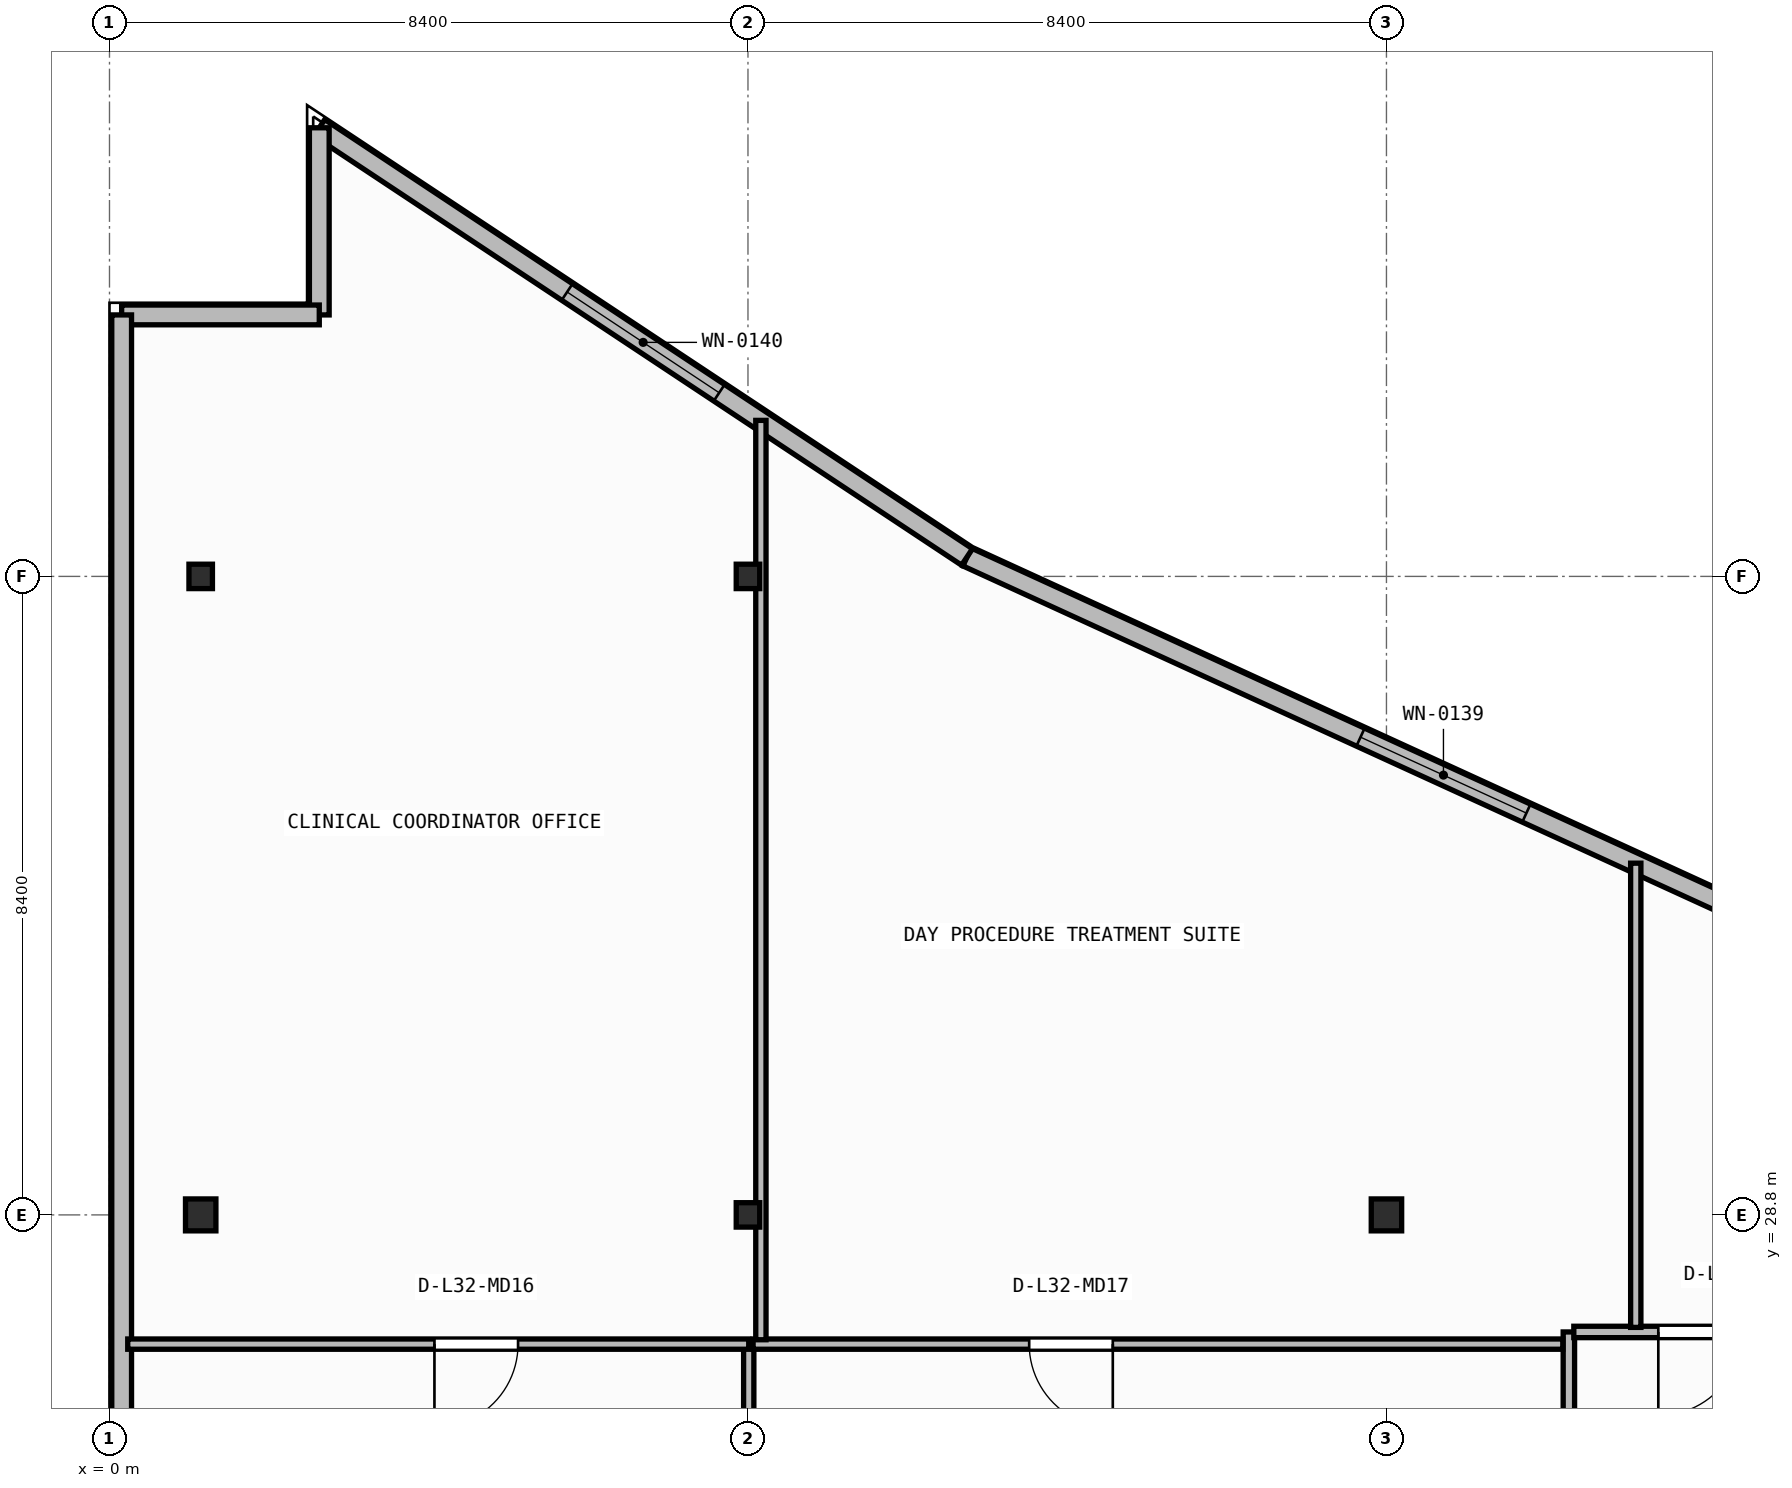
"""IFC4 building model, lengths in metres.
Left out: names, types, materials, properties, quantities, classifications, styles, units other than length and angle.
Written with IfcOpenShell. Run it as: python <this file> out.ifc"""

import sys

from ifc_helpers import new_model, si_unit, direction, frame, frame_2d, origin, origin_2d, place, context, subcontext, project, spatial, rectangle, i_section, extrude, element, fill, save


model = new_model("IFC4")
c1 = context("Model", 3, precision=1e-05, world=origin(), true_north=direction((0.0, 1.0)))
c2 = subcontext(c1, "Body", "Model", "MODEL_VIEW")
j1 = project(units=[si_unit("LENGTHUNIT", "METRE"), si_unit("PLANEANGLEUNIT", "RADIAN")], contexts=[c1])
p1 = place(None, origin())
s1 = spatial("IfcSite", under=j1, at=p1, CompositionType="ELEMENT")
p2 = place(p1, origin())
s2 = spatial("IfcBuilding", under=s1, at=p2, CompositionType="ELEMENT")
p3 = place(p2, frame((0.0, 0.0, 131.0)))
s3 = spatial("IfcBuildingStorey", under=s2, at=p3, CompositionType="ELEMENT", Elevation=131.0)
p4 = place(p3, frame((1.2, 28.8, 0.0), z_axis=(0.0, 0.0, 1.0), x_axis=(1.0, 0.0, 0.0)))
e1 = element("IfcColumn", 1, at=p4, inside=s3, PredefinedType="COLUMN", context=c2, shape_type="SweptSolid", body=[
    extrude(i_section(OverallWidth=0.4, OverallDepth=0.42, WebThickness=0.025, FlangeThickness=0.04, at=origin_2d()), origin(), (0.0, 0.0, 1.0), 3.95),
])
p5 = place(p3, frame((8.4, 28.8, 0.0), z_axis=(0.0, 0.0, 1.0), x_axis=(1.0, 0.0, 0.0)))
e2 = element("IfcColumn", 2, at=p5, inside=s3, PredefinedType="COLUMN", context=c2, shape_type="SweptSolid", body=[
    extrude(i_section(OverallWidth=0.309, OverallDepth=0.321, WebThickness=0.014, FlangeThickness=0.022, FilletRadius=0.017, at=origin_2d()), origin(), (0.0, 0.0, 1.0), 3.95),
])
p6 = place(p3, frame((16.8, 28.8, 0.0), z_axis=(0.0, 0.0, 1.0), x_axis=(1.0, 0.0, 0.0)))
e3 = element("IfcColumn", 3, at=p6, inside=s3, PredefinedType="COLUMN", context=c2, shape_type="SweptSolid", body=[
    extrude(i_section(OverallWidth=0.4, OverallDepth=0.42, WebThickness=0.025, FlangeThickness=0.04, at=origin_2d()), origin(), (0.0, 0.0, 1.0), 3.95),
])
for number, where, z_axis, x_axis in (
    (4, (1.2, 37.2, 0.0), (0.0, 0.0, 1.0), (1.0, 0.0, 0.0)),
    (5, (8.4, 37.2, 0.0), (0.0, 0.0, 1.0), (1.0, 0.0, 0.0)),
):
    element("IfcColumn", number, at=place(p3, frame(where, z_axis=z_axis, x_axis=x_axis)), inside=s3, PredefinedType="COLUMN", context=c2, shape_type="SweptSolid", body=[
        extrude(i_section(OverallWidth=0.309, OverallDepth=0.321, WebThickness=0.014, FlangeThickness=0.022, FilletRadius=0.017, at=origin_2d()), origin(), (0.0, 0.0, 1.0), 3.95),
    ])
p7 = place(p3, frame((23.818, 31.716, 0.0), z_axis=(0.0, 0.0, 1.0), x_axis=(-0.909209527513, 0.416338846471, 0.0)))
e6 = element("IfcWall", 6, at=p7, inside=s3, PredefinedType="STANDARD", context=c2, shape_type="SweptSolid", body=[
    extrude(rectangle(XDim=13.787, YDim=0.26, at=frame_2d((6.894, 0.0))), origin(), (0.0, 0.0, 1.0), 3.71),
])
p8 = place(p7, frame((5.694, 0.0, 0.9)))
e7 = element("IfcOpeningElement", 7, at=p8, cuts=e6, PredefinedType="OPENING", context=c2, shape_type="SweptSolid", body=[
    extrude(rectangle(XDim=2.4, YDim=1.65, at=frame_2d((1.2, 0.825))), frame((0.0, 0.14, 0.0), z_axis=(0.0, -1.0, 0.0), x_axis=(1.0, 0.0, 0.0)), (0.0, 0.0, 1.0), 0.28),
])
p9 = place(p3, frame((11.282, 37.456, 0.0), z_axis=(0.0, 0.0, 1.0), x_axis=(-0.833630474253, 0.552322580017, 0.0)))
e8 = element("IfcWall", 8, at=p9, inside=s3, PredefinedType="STANDARD", context=c2, shape_type="SweptSolid", body=[
    extrude(rectangle(XDim=10.223, YDim=0.26, at=frame_2d((5.111, 0.0))), origin(), (0.0, 0.0, 1.0), 3.71),
])
p10 = place(p9, frame((3.911, 0.0, 0.9)))
e9 = element("IfcOpeningElement", 9, at=p10, cuts=e8, PredefinedType="OPENING", context=c2, shape_type="SweptSolid", body=[
    extrude(rectangle(XDim=2.4, YDim=1.65, at=frame_2d((1.2, 0.825))), frame((0.0, 0.14, 0.0), z_axis=(0.0, -1.0, 0.0), x_axis=(1.0, 0.0, 0.0)), (0.0, 0.0, 1.0), 0.28),
])
p11 = place(p3, frame((2.76, 43.102, 0.0), z_axis=(0.0, 0.0, 1.0), x_axis=(0.0, -1.0, 0.0)))
e10 = element("IfcWall", 10, at=p11, inside=s3, PredefinedType="STANDARD", context=c2, shape_type="SweptSolid", body=[
    extrude(rectangle(XDim=2.462, YDim=0.26, at=frame_2d((1.231, 0.0))), origin(), (0.0, 0.0, 1.0), 3.71),
])
p12 = place(p3, frame((2.76, 40.64, 0.0), z_axis=(0.0, 0.0, 1.0), x_axis=(-1.0, 0.0, 0.0)))
e11 = element("IfcWall", 11, at=p12, inside=s3, PredefinedType="STANDARD", context=c2, shape_type="SweptSolid", body=[
    extrude(rectangle(XDim=2.6, YDim=0.26, at=frame_2d((1.3, 0.0))), origin(), (0.0, 0.0, 1.0), 3.71),
])
p13 = place(p3, frame((0.16, 40.64, 0.0), z_axis=(0.0, 0.0, 1.0), x_axis=(0.0, -1.0, 0.0)))
e12 = element("IfcWall", 12, at=p13, inside=s3, PredefinedType="STANDARD", context=c2, shape_type="SweptSolid", body=[
    extrude(rectangle(XDim=37.88, YDim=0.26, at=frame_2d((18.94, 0.0))), origin(), (0.0, 0.0, 1.0), 3.71),
])
p14 = place(p13, frame((27.795, 0.0, 0.9)))
e13 = element("IfcOpeningElement", 13, at=p14, cuts=e12, PredefinedType="OPENING", context=c2, shape_type="SweptSolid", body=[
    extrude(rectangle(XDim=2.4, YDim=1.65, at=frame_2d((1.2, 0.825))), frame((0.0, 0.14, 0.0), z_axis=(0.0, -1.0, 0.0), x_axis=(1.0, 0.0, 0.0)), (0.0, 0.0, 1.0), 0.28),
])
p15 = place(p3, frame((19.2, 27.26, 0.0), z_axis=(0.0, 0.0, 1.0), x_axis=(0.0, -1.0, 0.0)))
e14 = element("IfcWall", 14, at=p15, inside=s3, PredefinedType="PARTITIONING", context=c2, shape_type="SweptSolid", body=[
    extrude(rectangle(XDim=6.482, YDim=0.15, at=frame_2d((3.241, 0.0))), origin(), (0.0, 0.0, 1.0), 3.71),
])
p16 = place(p15, frame((2.068, 0.0, 0.0)))
e15 = element("IfcOpeningElement", 15, at=p16, cuts=e14, PredefinedType="OPENING", context=c2, shape_type="SweptSolid", body=[
    extrude(rectangle(XDim=1.1, YDim=2.1, at=frame_2d((0.55, 1.05))), frame((0.0, 0.085, 0.0), z_axis=(0.0, -1.0, 0.0), x_axis=(1.0, 0.0, 0.0)), (0.0, 0.0, 1.0), 0.17),
])
p17 = place(p3, frame((21.7, 27.26, 0.0), z_axis=(0.0, 0.0, 1.0), x_axis=(-1.0, 0.0, 0.0)))
e16 = element("IfcWall", 16, at=p17, inside=s3, PredefinedType="PARTITIONING", context=c2, shape_type="SweptSolid", body=[
    extrude(rectangle(XDim=2.435, YDim=0.15, at=frame_2d((1.218, 0.0))), origin(), (0.0, 0.0, 1.0), 3.71),
])
p18 = place(p17, frame((0.223, 0.0, 0.0)))
e17 = element("IfcOpeningElement", 17, at=p18, cuts=e16, PredefinedType="OPENING", context=c2, shape_type="SweptSolid", body=[
    extrude(rectangle(XDim=1.1, YDim=2.1, at=frame_2d((0.55, 1.05))), frame((0.0, 0.085, 0.0), z_axis=(0.0, -1.0, 0.0), x_axis=(1.0, 0.0, 0.0)), (0.0, 0.0, 1.0), 0.17),
])
p19 = place(p3, frame((8.41, 20.607, 0.0), z_axis=(0.0, 0.0, 1.0), x_axis=(0.0, 1.0, 0.0)))
e18 = element("IfcWall", 18, at=p19, inside=s3, PredefinedType="PARTITIONING", context=c2, shape_type="SweptSolid", body=[
    extrude(rectangle(XDim=6.493, YDim=0.135, at=frame_2d((3.246, 0.0))), origin(), (0.0, 0.0, 1.0), 3.152),
])
p20 = place(p3, frame((8.41, 27.1, 0.0), z_axis=(0.0, 0.0, 1.0), x_axis=(-1.0, 0.0, 0.0)))
e19 = element("IfcWall", 19, at=p20, inside=s3, PredefinedType="PARTITIONING", context=c2, shape_type="SweptSolid", body=[
    extrude(rectangle(XDim=8.17, YDim=0.135, at=frame_2d((4.085, 0.0))), origin(), (0.0, 0.0, 1.0), 3.71),
])
p21 = place(p20, frame((3.035, 0.0, 0.0)))
e20 = element("IfcOpeningElement", 20, at=p21, cuts=e19, PredefinedType="OPENING", context=c2, shape_type="SweptSolid", body=[
    extrude(rectangle(XDim=1.1, YDim=2.1, at=frame_2d((0.55, 1.05))), frame((0.0, 0.077, 0.0), z_axis=(0.0, -1.0, 0.0), x_axis=(1.0, 0.0, 0.0)), (0.0, 0.0, 1.0), 0.155),
])
p22 = place(p3, frame((19.12, 27.1, 0.0), z_axis=(0.0, 0.0, 1.0), x_axis=(-1.0, 0.0, 0.0)))
e21 = element("IfcWall", 21, at=p22, inside=s3, PredefinedType="PARTITIONING", context=c2, shape_type="SweptSolid", body=[
    extrude(rectangle(XDim=10.653, YDim=0.135, at=frame_2d((5.326, 0.0))), origin(), (0.0, 0.0, 1.0), 3.71),
])
p23 = place(p22, frame((5.92, 0.0, 0.0)))
e22 = element("IfcOpeningElement", 22, at=p23, cuts=e21, PredefinedType="OPENING", context=c2, shape_type="SweptSolid", body=[
    extrude(rectangle(XDim=1.1, YDim=2.1, at=frame_2d((0.55, 1.05))), frame((0.0, 0.077, 0.0), z_axis=(0.0, -1.0, 0.0), x_axis=(1.0, 0.0, 0.0)), (0.0, 0.0, 1.0), 0.155),
])
p24 = place(p3, frame((8.57, 27.157, 0.0), z_axis=(0.0, 0.0, 1.0), x_axis=(0.0, 1.0, 0.0)))
e23 = element("IfcWall", 23, at=p24, inside=s3, PredefinedType="PARTITIONING", context=c2, shape_type="SweptSolid", body=[
    extrude(rectangle(XDim=12.095, YDim=0.135, at=frame_2d((6.048, 0.0))), origin(), (0.0, 0.0, 1.0), 3.152),
])
p25 = place(p3, frame((20.08, 27.32, 0.0), z_axis=(0.0, 0.0, 1.0), x_axis=(0.0, 1.0, 0.0)))
e24 = element("IfcWall", 24, at=p25, inside=s3, PredefinedType="PARTITIONING", context=c2, shape_type="SweptSolid", body=[
    extrude(rectangle(XDim=6.107, YDim=0.135, at=frame_2d((3.053, 0.0))), origin(), (0.0, 0.0, 1.0), 3.71),
])
p26 = place(p8, origin())
e25 = element("IfcWindow", 25, at=p26, inside=s3, PartitioningType="SINGLE_PANEL", PredefinedType="WINDOW", context=c2, shape_type="SweptSolid", body=[
    extrude(rectangle(XDim=2.4, YDim=1.65, at=frame_2d((1.2, 0.825))), frame((0.0, 0.03, 0.0), z_axis=(0.0, -1.0, 0.0), x_axis=(1.0, 0.0, 0.0)), (0.0, 0.0, 1.0), 0.06),
])
fill(e7, e25)
p27 = place(p10, origin())
e26 = element("IfcWindow", 26, at=p27, inside=s3, PartitioningType="SINGLE_PANEL", PredefinedType="WINDOW", context=c2, shape_type="SweptSolid", body=[
    extrude(rectangle(XDim=2.4, YDim=1.65, at=frame_2d((1.2, 0.825))), frame((0.0, 0.03, 0.0), z_axis=(0.0, -1.0, 0.0), x_axis=(1.0, 0.0, 0.0)), (0.0, 0.0, 1.0), 0.06),
])
fill(e9, e26)
p28 = place(p18, origin())
e27 = element("IfcDoor", 27, at=p28, inside=s3, OperationType="SINGLE_SWING_RIGHT", PredefinedType="DOOR", context=c2, shape_type="SweptSolid", body=[
    extrude(rectangle(XDim=1.1, YDim=2.1, at=frame_2d((0.55, 1.05))), frame((0.0, 0.025, 0.0), z_axis=(0.0, -1.0, 0.0), x_axis=(1.0, 0.0, 0.0)), (0.0, 0.0, 1.0), 0.05),
])
fill(e17, e27)
p29 = place(p21, origin())
e28 = element("IfcDoor", 28, at=p29, inside=s3, OperationType="SINGLE_SWING_RIGHT", PredefinedType="DOOR", context=c2, shape_type="SweptSolid", body=[
    extrude(rectangle(XDim=1.1, YDim=2.1, at=frame_2d((0.55, 1.05))), frame((0.0, 0.025, 0.0), z_axis=(0.0, -1.0, 0.0), x_axis=(1.0, 0.0, 0.0)), (0.0, 0.0, 1.0), 0.05),
])
fill(e20, e28)
p30 = place(p23, origin())
e29 = element("IfcDoor", 29, at=p30, inside=s3, OperationType="SINGLE_SWING_LEFT", PredefinedType="DOOR", context=c2, shape_type="SweptSolid", body=[
    extrude(rectangle(XDim=1.1, YDim=2.1, at=frame_2d((0.55, 1.05))), frame((0.0, 0.025, 0.0), z_axis=(0.0, -1.0, 0.0), x_axis=(1.0, 0.0, 0.0)), (0.0, 0.0, 1.0), 0.05),
])
fill(e22, e29)
save(model, sys.argv[1])
